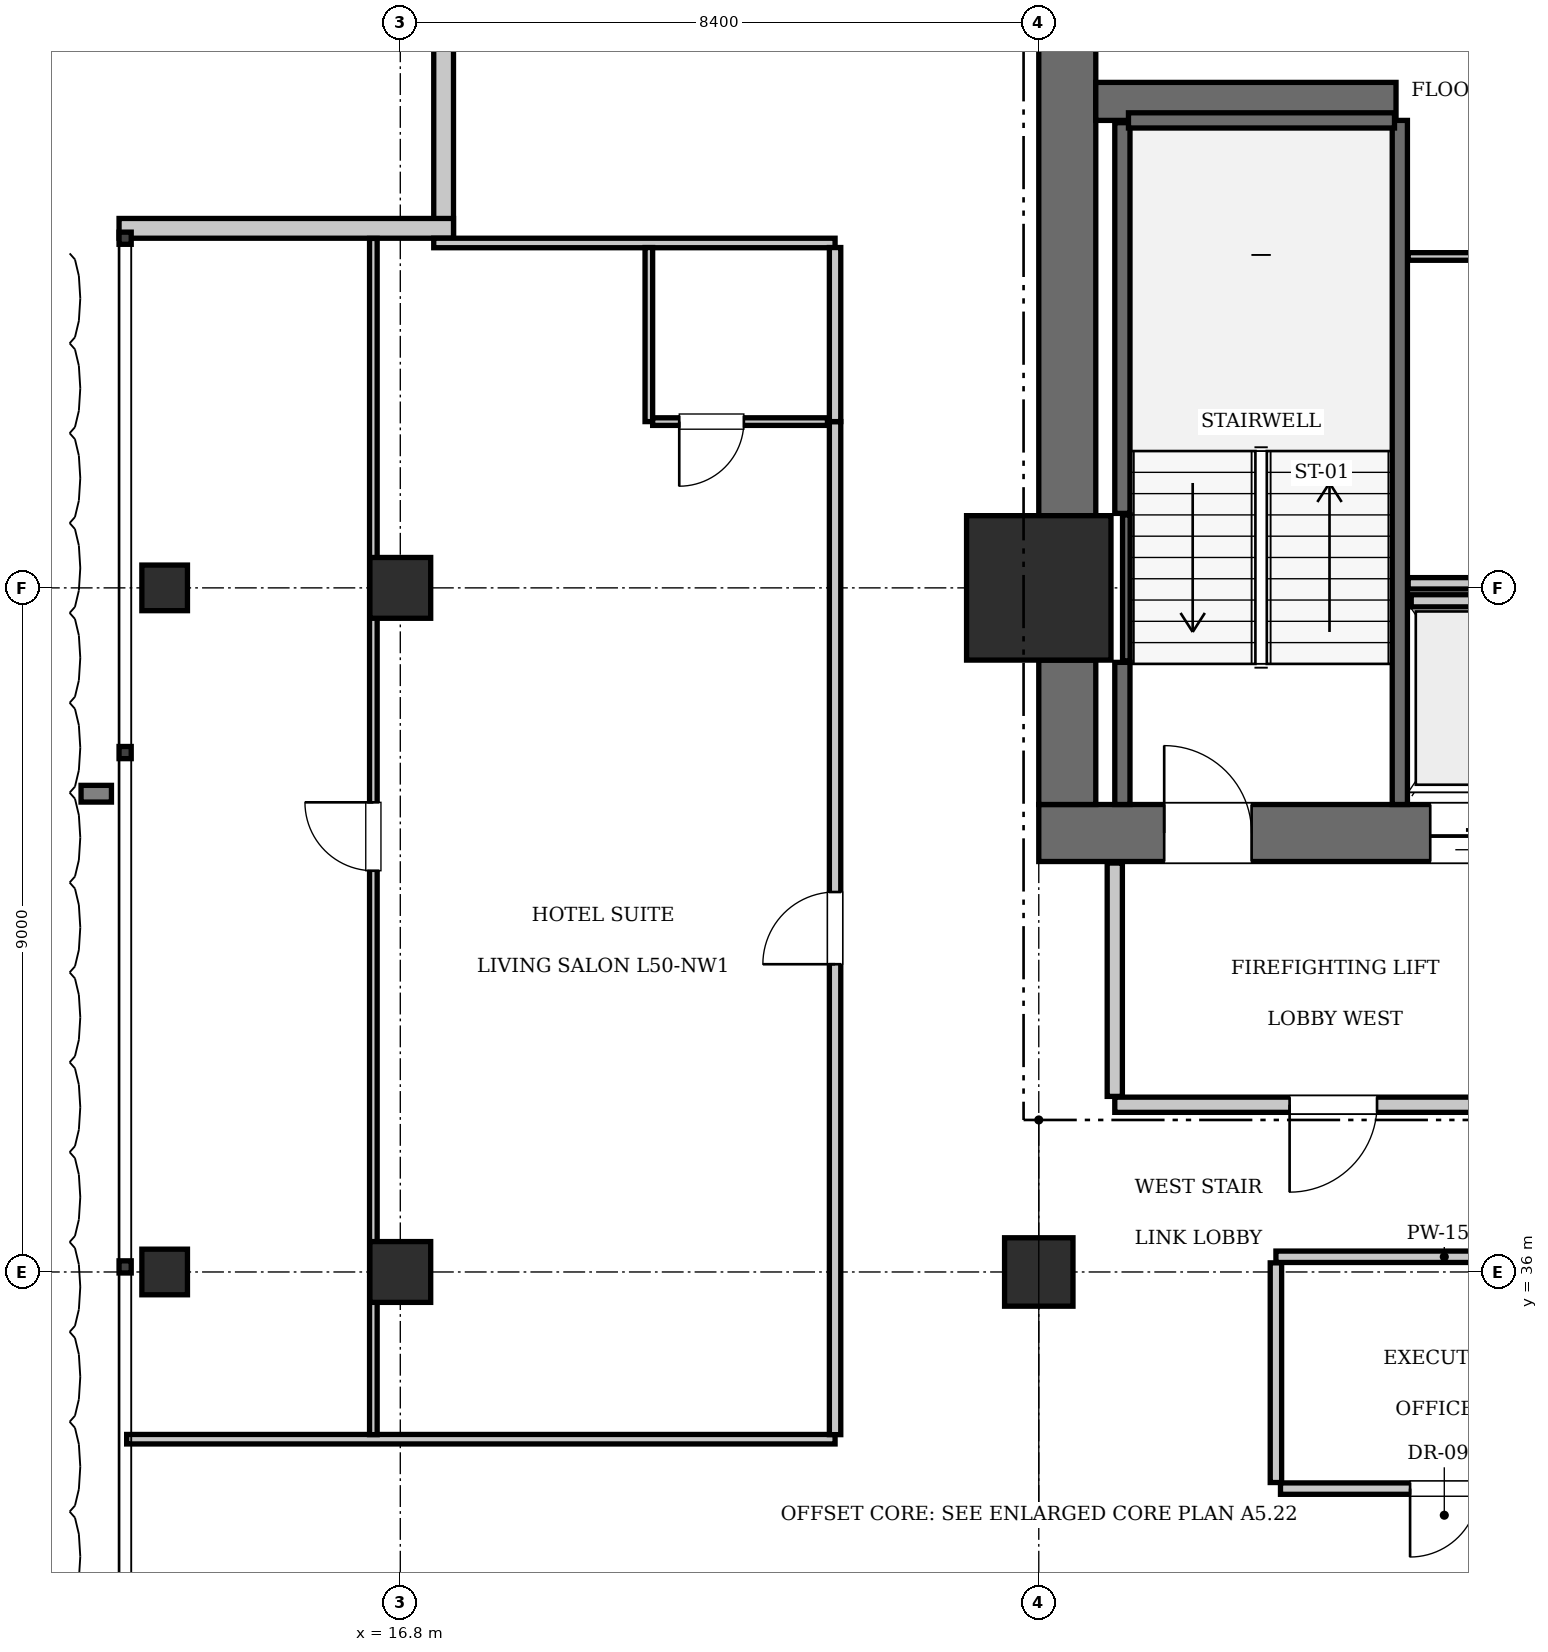
"""IFC4 building model, lengths in metres.
Left out: names, types, materials, properties, quantities, classifications, styles, units other than length and angle.
Written with IfcOpenShell. Run it as: python <this file> out.ifc"""

import sys

from ifc_helpers import new_model, si_unit, direction, frame, frame_2d, origin, origin_2d, place, context, subcontext, project, spatial, rectangle, i_section, extrude, element, fill, save


model = new_model("IFC4")
c1 = context("Model", 3, precision=1e-05, world=origin(), true_north=direction((0.0, 1.0)))
c2 = subcontext(c1, "Body", "Model", "MODEL_VIEW")
j1 = project(units=[si_unit("LENGTHUNIT", "METRE"), si_unit("PLANEANGLEUNIT", "RADIAN")], contexts=[c1])
p1 = place(None, origin())
s1 = spatial("IfcSite", under=j1, at=p1, CompositionType="ELEMENT")
p2 = place(p1, origin())
s2 = spatial("IfcBuilding", under=s1, at=p2, CompositionType="ELEMENT")
p3 = place(p2, frame((0.0, 0.0, 204.4)))
s3 = spatial("IfcBuildingStorey", under=s2, at=p3, CompositionType="ELEMENT", Elevation=204.4)
p4 = place(p3, frame((25.2, 45.0, 0.0), z_axis=(0.0, 0.0, 1.0), x_axis=(1.0, 0.0, 0.0)))
e1 = element("IfcColumn", 1, at=p4, inside=s3, PredefinedType="COLUMN", context=c2, shape_type="SweptSolid", body=[
    extrude(rectangle(XDim=1.9, YDim=1.9, at=origin_2d()), origin(), (0.0, 0.0, 1.0), 3.85),
])
p5 = place(p3, frame((25.2, 41.775, 0.0), z_axis=(0.0, 0.0, 1.0), x_axis=(1.0, 0.0, 0.0)))
e2 = element("IfcWall", 2, at=p5, inside=s3, PredefinedType="SHEAR", context=c2, shape_type="SweptSolid", body=[
    extrude(rectangle(XDim=6.8, YDim=0.75, at=frame_2d((3.4, 0.0))), origin(), (0.0, 0.0, 1.0), 3.85),
])
p6 = place(p5, frame((1.65, 0.0, 0.0)))
e3 = element("IfcOpeningElement", 3, at=p6, cuts=e2, PredefinedType="OPENING", context=c2, shape_type="SweptSolid", body=[
    extrude(rectangle(XDim=1.15, YDim=2.15, at=frame_2d((0.575, 1.075))), frame((0.0, 0.385, 0.0), z_axis=(0.0, -1.0, 0.0), x_axis=(1.0, 0.0, 0.0)), (0.0, 0.0, 1.0), 0.77),
])
p7 = place(p5, frame((5.15, 0.0, 0.0)))
e4 = element("IfcOpeningElement", 4, at=p7, cuts=e2, PredefinedType="OPENING", context=c2, shape_type="SweptSolid", body=[
    extrude(rectangle(XDim=1.1, YDim=2.2, at=frame_2d((0.55, 1.1))), frame((0.0, 0.385, 0.0), z_axis=(0.0, -1.0, 0.0), x_axis=(1.0, 0.0, 0.0)), (0.0, 0.0, 1.0), 0.77),
])
p8 = place(p3, frame((25.575, 42.15, 0.0), z_axis=(0.0, 0.0, 1.0), x_axis=(0.0, 1.0, 0.0)))
e5 = element("IfcWall", 5, at=p8, inside=s3, PredefinedType="SHEAR", context=c2, shape_type="SweptSolid", body=[
    extrude(rectangle(XDim=1.9, YDim=0.75, at=frame_2d((0.95, 0.0))), origin(), (0.0, 0.0, 1.0), 3.85),
])
p9 = place(p3, frame((25.575, 45.95, 0.0), z_axis=(0.0, 0.0, 1.0), x_axis=(0.0, 1.0, 0.0)))
e6 = element("IfcWall", 6, at=p9, inside=s3, PredefinedType="SHEAR", context=c2, shape_type="SweptSolid", body=[
    extrude(rectangle(XDim=7.3, YDim=0.75, at=frame_2d((3.65, 0.0))), origin(), (0.0, 0.0, 1.0), 3.85),
])
p10 = place(p3, frame((25.95, 51.4, 0.0), z_axis=(0.0, 0.0, 1.0), x_axis=(1.0, 0.0, 0.0)))
e7 = element("IfcWall", 7, at=p10, inside=s3, PredefinedType="SHEAR", context=c2, shape_type="SweptSolid", body=[
    extrude(rectangle(XDim=3.95, YDim=0.5, at=frame_2d((1.975, 0.0))), origin(), (0.0, 0.0, 1.0), 3.85),
])
p11 = place(p3, frame((25.2, 36.0, 0.0), z_axis=(0.0, 0.0, 1.0), x_axis=(1.0, 0.0, 0.0)))
e8 = element("IfcColumn", 8, at=p11, inside=s3, PredefinedType="COLUMN", context=c2, shape_type="SweptSolid", body=[
    extrude(rectangle(XDim=0.9, YDim=0.9, at=origin_2d()), origin(), (0.0, 0.0, 1.0), 3.85),
])
for number, where, z_axis, x_axis in (
    (9, (16.8, 36.0, 0.0), (0.0, 0.0, 1.0), (1.0, 0.0, 0.0)),
    (10, (16.8, 45.0, 0.0), (0.0, 0.0, 1.0), (1.0, 0.0, 0.0)),
):
    element("IfcColumn", number, at=place(p3, frame(where, z_axis=z_axis, x_axis=x_axis)), inside=s3, PredefinedType="COLUMN", context=c2, shape_type="SweptSolid", body=[
        extrude(rectangle(XDim=0.8, YDim=0.8, at=origin_2d()), origin(), (0.0, 0.0, 1.0), 3.85),
    ])
for number, where, z_axis, x_axis in (
    (11, (13.7, 36.0, 0.0), (0.0, 0.0, 1.0), (1.0, 0.0, 0.0)),
    (12, (13.7, 45.0, 0.0), (0.0, 0.0, 1.0), (1.0, 0.0, 0.0)),
):
    element("IfcColumn", number, at=place(p3, frame(where, z_axis=z_axis, x_axis=x_axis)), inside=s3, PredefinedType="COLUMN", context=c2, shape_type="SweptSolid", body=[
        extrude(i_section(OverallWidth=0.6, OverallDepth=0.6, WebThickness=0.025, FlangeThickness=0.038, at=origin_2d()), origin(), (0.0, 0.0, 1.0), 3.85),
    ])
p12 = place(p3, frame((29.95, 42.15, 0.0), z_axis=(0.0, 0.0, 1.0), x_axis=(0.0, 1.0, 0.0)))
e13 = element("IfcWall", 13, at=p12, inside=s3, PredefinedType="SOLIDWALL", context=c2, shape_type="SweptSolid", body=[
    extrude(rectangle(XDim=9.0, YDim=0.2, at=frame_2d((4.5, 0.0))), origin(), (0.0, 0.0, 1.0), 3.61),
])
p13 = place(p3, frame((26.3, 42.15, 0.0), z_axis=(0.0, 0.0, 1.0), x_axis=(0.0, 1.0, 0.0)))
e14 = element("IfcWall", 14, at=p13, inside=s3, PredefinedType="SOLIDWALL", context=c2, shape_type="SweptSolid", body=[
    extrude(rectangle(XDim=1.87, YDim=0.2, at=frame_2d((0.935, 0.0))), origin(), (0.0, 0.0, 1.0), 3.61),
])
p14 = place(p3, frame((26.3, 45.98, 0.0), z_axis=(0.0, 0.0, 1.0), x_axis=(0.0, 1.0, 0.0)))
e15 = element("IfcWall", 15, at=p14, inside=s3, PredefinedType="SOLIDWALL", context=c2, shape_type="SweptSolid", body=[
    extrude(rectangle(XDim=5.14, YDim=0.2, at=frame_2d((2.57, 0.0))), origin(), (0.0, 0.0, 1.0), 3.61),
])
p15 = place(p3, frame((26.38, 51.15, 0.0), z_axis=(0.0, 0.0, 1.0), x_axis=(1.0, 0.0, 0.0)))
e16 = element("IfcWall", 16, at=p15, inside=s3, PredefinedType="SOLIDWALL", context=c2, shape_type="SweptSolid", body=[
    extrude(rectangle(XDim=3.5, YDim=0.2, at=frame_2d((1.75, 0.0))), origin(), (0.0, 0.0, 1.0), 3.61),
])
p16 = place(p3, frame((26.352, 44.04, 0.0), z_axis=(0.0, 0.0, 1.0), x_axis=(0.0, 1.0, 0.0)))
e17 = element("IfcWall", 17, at=p16, inside=s3, PredefinedType="SOLIDWALL", context=c2, shape_type="SweptSolid", body=[
    extrude(rectangle(XDim=1.92, YDim=0.1, at=frame_2d((0.96, 0.0))), origin(), (0.0, 0.0, 1.0), 3.61),
])
p17 = place(p3, frame((30.1, 44.83, 0.0), z_axis=(0.0, 0.0, 1.0), x_axis=(1.0, 0.0, 0.0)))
e18 = element("IfcWall", 18, at=p17, inside=s3, PredefinedType="SOLIDWALL", context=c2, shape_type="SweptSolid", body=[
    extrude(rectangle(XDim=1.6, YDim=0.16, at=frame_2d((0.8, 0.0))), origin(), (0.0, 0.0, 1.0), 3.61),
])
for number, where, z_axis, x_axis in (
    (19, (17.37, 49.6, 0.0), (0.0, 0.0, 1.0), (0.0, 1.0, 0.0)),
    (20, (13.1, 49.73, 0.0), (0.0, 0.0, 1.0), (1.0, 0.0, 0.0)),
):
    element("IfcWall", number, at=place(p3, frame(where, z_axis=z_axis, x_axis=x_axis)), inside=s3, PredefinedType="SOLIDWALL", context=c2, shape_type="SweptSolid", body=[
        extrude(rectangle(XDim=4.4, YDim=0.26, at=frame_2d((2.2, 0.0))), origin(), (0.0, 0.0, 1.0), 3.61),
    ])
p18 = place(p3, frame((26.2, 38.2, 0.0), z_axis=(0.0, 0.0, 1.0), x_axis=(1.0, 0.0, 0.0)))
e21 = element("IfcWall", 21, at=p18, inside=s3, PredefinedType="PARTITIONING", context=c2, shape_type="SweptSolid", body=[
    extrude(rectangle(XDim=5.8, YDim=0.2, at=frame_2d((2.9, 0.0))), origin(), (0.0, 0.0, 1.0), 3.61),
])
p19 = place(p18, frame((2.3, 0.0, 0.0)))
e22 = element("IfcOpeningElement", 22, at=p19, cuts=e21, PredefinedType="OPENING", context=c2, shape_type="SweptSolid", body=[
    extrude(rectangle(XDim=1.15, YDim=2.15, at=frame_2d((0.575, 1.075))), frame((0.0, 0.11, 0.0), z_axis=(0.0, -1.0, 0.0), x_axis=(1.0, 0.0, 0.0)), (0.0, 0.0, 1.0), 0.22),
])
p20 = place(p3, frame((26.2, 38.31, 0.0), z_axis=(0.0, 0.0, 1.0), x_axis=(0.0, 1.0, 0.0)))
e23 = element("IfcWall", 23, at=p20, inside=s3, PredefinedType="PARTITIONING", context=c2, shape_type="SweptSolid", body=[
    extrude(rectangle(XDim=3.07, YDim=0.2, at=frame_2d((1.535, 0.0))), origin(), (0.0, 0.0, 1.0), 3.61),
])
p21 = place(p3, frame((30.06, 45.06, 0.0), z_axis=(0.0, 0.0, 1.0), x_axis=(1.0, 0.0, 0.0)))
e24 = element("IfcWall", 24, at=p21, inside=s3, PredefinedType="PARTITIONING", context=c2, shape_type="SweptSolid", body=[
    extrude(rectangle(XDim=3.18, YDim=0.15, at=frame_2d((1.59, 0.0))), origin(), (0.0, 0.0, 1.0), 3.61),
])
p22 = place(p3, frame((30.06, 49.36, 0.0), z_axis=(0.0, 0.0, 1.0), x_axis=(1.0, 0.0, 0.0)))
e25 = element("IfcWall", 25, at=p22, inside=s3, PredefinedType="PARTITIONING", context=c2, shape_type="SweptSolid", body=[
    extrude(rectangle(XDim=3.18, YDim=0.1, at=frame_2d((1.59, 0.0))), origin(), (0.0, 0.0, 1.0), 3.61),
])
p23 = place(p22, frame((1.95, 0.0, 0.0)))
e26 = element("IfcOpeningElement", 26, at=p23, cuts=e25, PredefinedType="OPENING", context=c2, shape_type="SweptSolid", body=[
    extrude(rectangle(XDim=0.8, YDim=2.05, at=frame_2d((0.4, 1.025))), frame((0.0, 0.06, 0.0), z_axis=(0.0, -1.0, 0.0), x_axis=(1.0, 0.0, 0.0)), (0.0, 0.0, 1.0), 0.12),
])
p24 = place(p3, frame((28.32, 36.2, 0.0), z_axis=(0.0, 0.0, 1.0), x_axis=(1.0, 0.0, 0.0)))
e27 = element("IfcWall", 27, at=p24, inside=s3, PredefinedType="PARTITIONING", context=c2, shape_type="SweptSolid", body=[
    extrude(rectangle(XDim=4.43, YDim=0.15, at=frame_2d((2.215, 0.0))), origin(), (0.0, 0.0, 1.0), 3.61),
])
p25 = place(p3, frame((28.32, 33.23, 0.0), z_axis=(0.0, 0.0, 1.0), x_axis=(0.0, 1.0, 0.0)))
e28 = element("IfcWall", 28, at=p25, inside=s3, PredefinedType="PARTITIONING", context=c2, shape_type="SweptSolid", body=[
    extrude(rectangle(XDim=2.89, YDim=0.15, at=frame_2d((1.445, 0.0))), origin(), (0.0, 0.0, 1.0), 3.61),
])
p26 = place(p3, frame((28.38, 33.15, 0.0), z_axis=(0.0, 0.0, 1.0), x_axis=(1.0, 0.0, 0.0)))
e29 = element("IfcWall", 29, at=p26, inside=s3, PredefinedType="PARTITIONING", context=c2, shape_type="SweptSolid", body=[
    extrude(rectangle(XDim=4.31, YDim=0.15, at=frame_2d((2.155, 0.0))), origin(), (0.0, 0.0, 1.0), 3.61),
])
p27 = place(p26, frame((1.705, 0.0, 0.0)))
e30 = element("IfcOpeningElement", 30, at=p27, cuts=e29, PredefinedType="OPENING", context=c2, shape_type="SweptSolid", body=[
    extrude(rectangle(XDim=0.9, YDim=2.1, at=frame_2d((0.45, 1.05))), frame((0.0, 0.085, 0.0), z_axis=(0.0, -1.0, 0.0), x_axis=(1.0, 0.0, 0.0)), (0.0, 0.0, 1.0), 0.17),
])
p28 = place(p3, frame((13.2, 33.8, 0.0), z_axis=(0.0, 0.0, 1.0), x_axis=(1.0, 0.0, 0.0)))
e31 = element("IfcWall", 31, at=p28, inside=s3, PredefinedType="PARTITIONING", context=c2, shape_type="SweptSolid", body=[
    extrude(rectangle(XDim=9.32, YDim=0.125, at=frame_2d((4.66, 0.0))), origin(), (0.0, 0.0, 1.0), 3.61),
])
p29 = place(p3, frame((17.24, 49.538, 0.0), z_axis=(0.0, 0.0, 1.0), x_axis=(1.0, 0.0, 0.0)))
e32 = element("IfcWall", 32, at=p29, inside=s3, PredefinedType="PARTITIONING", context=c2, shape_type="SweptSolid", body=[
    extrude(rectangle(XDim=5.28, YDim=0.125, at=frame_2d((2.64, 0.0))), origin(), (0.0, 0.0, 1.0), 3.61),
])
p30 = place(p3, frame((22.52, 33.86, 0.0), z_axis=(0.0, 0.0, 1.0), x_axis=(0.0, 1.0, 0.0)))
e33 = element("IfcWall", 33, at=p30, inside=s3, PredefinedType="PARTITIONING", context=c2, shape_type="SweptSolid", body=[
    extrude(rectangle(XDim=13.327, YDim=0.15, at=frame_2d((6.664, 0.0))), origin(), (0.0, 0.0, 1.0), 3.61),
])
p31 = place(p30, frame((6.189, 0.0, 0.0)))
e34 = element("IfcOpeningElement", 34, at=p31, cuts=e33, PredefinedType="OPENING", context=c2, shape_type="SweptSolid", body=[
    extrude(rectangle(XDim=0.95, YDim=2.15, at=frame_2d((0.475, 1.075))), frame((0.0, 0.085, 0.0), z_axis=(0.0, -1.0, 0.0), x_axis=(1.0, 0.0, 0.0)), (0.0, 0.0, 1.0), 0.17),
])
p32 = place(p3, frame((22.52, 47.188, 0.0), z_axis=(0.0, 0.0, 1.0), x_axis=(0.0, 1.0, 0.0)))
e35 = element("IfcWall", 35, at=p32, inside=s3, PredefinedType="PARTITIONING", context=c2, shape_type="SweptSolid", body=[
    extrude(rectangle(XDim=2.29, YDim=0.15, at=frame_2d((1.145, 0.0))), origin(), (0.0, 0.0, 1.0), 3.61),
])
p33 = place(p3, frame((20.07, 47.188, 0.0), z_axis=(0.0, 0.0, 1.0), x_axis=(0.0, 1.0, 0.0)))
e36 = element("IfcWall", 36, at=p33, inside=s3, PredefinedType="PARTITIONING", context=c2, shape_type="SweptSolid", body=[
    extrude(rectangle(XDim=2.29, YDim=0.1, at=frame_2d((1.145, 0.0))), origin(), (0.0, 0.0, 1.0), 3.61),
])
p34 = place(p3, frame((20.12, 47.188, 0.0), z_axis=(0.0, 0.0, 1.0), x_axis=(1.0, 0.0, 0.0)))
e37 = element("IfcWall", 37, at=p34, inside=s3, PredefinedType="PARTITIONING", context=c2, shape_type="SweptSolid", body=[
    extrude(rectangle(XDim=2.3, YDim=0.1, at=frame_2d((1.15, 0.0))), origin(), (0.0, 0.0, 1.0), 3.61),
])
p35 = place(p34, frame((0.35, 0.0, 0.0)))
e38 = element("IfcOpeningElement", 38, at=p35, cuts=e37, PredefinedType="OPENING", context=c2, shape_type="SweptSolid", body=[
    extrude(rectangle(XDim=0.85, YDim=2.1, at=frame_2d((0.425, 1.05))), frame((0.0, 0.06, 0.0), z_axis=(0.0, -1.0, 0.0), x_axis=(1.0, 0.0, 0.0)), (0.0, 0.0, 1.0), 0.12),
])
p36 = place(p3, frame((16.446, 33.86, 0.0), z_axis=(0.0, 0.0, 1.0), x_axis=(0.0, 1.0, 0.0)))
e39 = element("IfcWall", 39, at=p36, inside=s3, PredefinedType="PARTITIONING", context=c2, shape_type="SweptSolid", body=[
    extrude(rectangle(XDim=15.737, YDim=0.1, at=frame_2d((7.869, 0.0))), origin(), (0.0, 0.0, 1.0), 3.61),
])
p37 = place(p36, frame((7.419, 0.0, 0.0)))
e40 = element("IfcOpeningElement", 40, at=p37, cuts=e39, PredefinedType="OPENING", context=c2, shape_type="SweptSolid", body=[
    extrude(rectangle(XDim=0.9, YDim=2.1, at=frame_2d((0.45, 1.05))), frame((0.0, 0.06, 0.0), z_axis=(0.0, -1.0, 0.0), x_axis=(1.0, 0.0, 0.0)), (0.0, 0.0, 1.0), 0.12),
])
p38 = place(p6, origin())
e41 = element("IfcDoor", 41, at=p38, inside=s3, OperationType="SINGLE_SWING_LEFT", PredefinedType="DOOR", context=c2, shape_type="SweptSolid", body=[
    extrude(rectangle(XDim=1.15, YDim=2.15, at=frame_2d((0.575, 1.075))), frame((0.0, 0.025, 0.0), z_axis=(0.0, -1.0, 0.0), x_axis=(1.0, 0.0, 0.0)), (0.0, 0.0, 1.0), 0.05),
])
fill(e3, e41)
p39 = place(p7, frame((1.1, 0.0, 0.0), z_axis=(0.0, 0.0, 1.0), x_axis=(-1.0, 0.0, 0.0)))
e42 = element("IfcDoor", 42, at=p39, inside=s3, OperationType="SLIDING_TO_LEFT", PredefinedType="DOOR", context=c2, shape_type="SweptSolid", body=[
    extrude(rectangle(XDim=1.1, YDim=2.2, at=frame_2d((0.55, 1.1))), frame((0.0, 0.025, 0.0), z_axis=(0.0, -1.0, 0.0), x_axis=(1.0, 0.0, 0.0)), (0.0, 0.0, 1.0), 0.05),
])
fill(e4, e42)
p40 = place(p19, frame((1.15, 0.0, 0.0), z_axis=(0.0, 0.0, 1.0), x_axis=(-1.0, 0.0, 0.0)))
e43 = element("IfcDoor", 43, at=p40, inside=s3, OperationType="SINGLE_SWING_RIGHT", PredefinedType="DOOR", context=c2, shape_type="SweptSolid", body=[
    extrude(rectangle(XDim=1.15, YDim=2.15, at=frame_2d((0.575, 1.075))), frame((0.0, 0.025, 0.0), z_axis=(0.0, -1.0, 0.0), x_axis=(1.0, 0.0, 0.0)), (0.0, 0.0, 1.0), 0.05),
])
fill(e22, e43)
p41 = place(p27, frame((0.9, 0.0, 0.0), z_axis=(0.0, 0.0, 1.0), x_axis=(-1.0, 0.0, 0.0)))
e44 = element("IfcDoor", 44, at=p41, inside=s3, OperationType="SINGLE_SWING_RIGHT", PredefinedType="DOOR", context=c2, shape_type="SweptSolid", body=[
    extrude(rectangle(XDim=0.9, YDim=2.1, at=frame_2d((0.45, 1.05))), frame((0.0, 0.025, 0.0), z_axis=(0.0, -1.0, 0.0), x_axis=(1.0, 0.0, 0.0)), (0.0, 0.0, 1.0), 0.05),
])
fill(e30, e44)
p42 = place(p35, frame((0.85, 0.0, 0.0), z_axis=(0.0, 0.0, 1.0), x_axis=(-1.0, 0.0, 0.0)))
e45 = element("IfcDoor", 45, at=p42, inside=s3, OperationType="SINGLE_SWING_RIGHT", PredefinedType="DOOR", context=c2, shape_type="SweptSolid", body=[
    extrude(rectangle(XDim=0.85, YDim=2.1, at=frame_2d((0.425, 1.05))), frame((0.0, 0.025, 0.0), z_axis=(0.0, -1.0, 0.0), x_axis=(1.0, 0.0, 0.0)), (0.0, 0.0, 1.0), 0.05),
])
fill(e38, e45)
p43 = place(p31, origin())
e46 = element("IfcDoor", 46, at=p43, inside=s3, OperationType="SINGLE_SWING_LEFT", PredefinedType="DOOR", context=c2, shape_type="SweptSolid", body=[
    extrude(rectangle(XDim=0.95, YDim=2.15, at=frame_2d((0.475, 1.075))), frame((0.0, 0.025, 0.0), z_axis=(0.0, -1.0, 0.0), x_axis=(1.0, 0.0, 0.0)), (0.0, 0.0, 1.0), 0.05),
])
fill(e34, e46)
p44 = place(p37, origin())
e47 = element("IfcDoor", 47, at=p44, inside=s3, OperationType="SINGLE_SWING_RIGHT", PredefinedType="DOOR", context=c2, shape_type="SweptSolid", body=[
    extrude(rectangle(XDim=0.9, YDim=2.1, at=frame_2d((0.45, 1.05))), frame((0.0, 0.025, 0.0), z_axis=(0.0, -1.0, 0.0), x_axis=(1.0, 0.0, 0.0)), (0.0, 0.0, 1.0), 0.05),
])
fill(e40, e47)
save(model, sys.argv[1])
